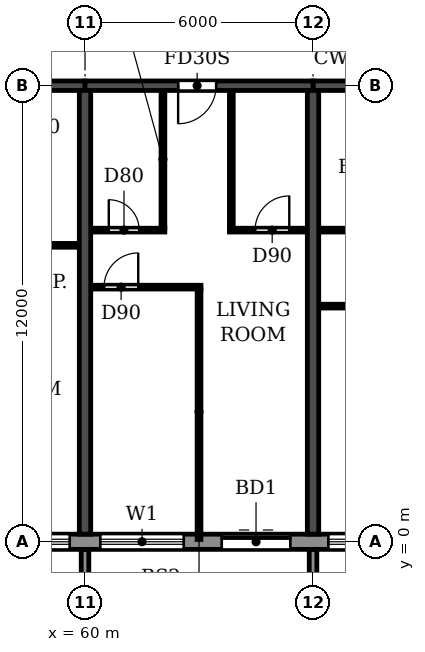
"""IFC4 building model, lengths in metres.
Left out: names, types, materials, properties, quantities, classifications, styles, units other than length and angle.
Written with IfcOpenShell. Run it as: python <this file> out.ifc"""

import sys

from ifc_helpers import new_model, si_unit, direction, frame, frame_2d, origin, place, context, subcontext, project, spatial, polyline, rectangle, outline, extrude, source, transform, mapped, element, fill, save


model = new_model("IFC4")
c1 = context("Model", 3, precision=1e-05, world=origin(), true_north=direction((0.0, 1.0)))
c2 = subcontext(c1, "Body", "Model", "MODEL_VIEW")
j1 = project(units=[si_unit("LENGTHUNIT", "METRE"), si_unit("PLANEANGLEUNIT", "RADIAN")], contexts=[c1])
p1 = place(None, origin())
s1 = spatial("IfcSite", under=j1, at=p1, CompositionType="ELEMENT")
p2 = place(p1, origin())
s2 = spatial("IfcBuilding", under=s1, at=p2, CompositionType="ELEMENT")
p3 = place(p2, frame((0.0, 0.0, 122.4)))
s3 = spatial("IfcBuildingStorey", under=s2, at=p3, CompositionType="ELEMENT", Elevation=122.4)
for number, where, z_axis, x_axis in (
    (1, (60.0, 0.2, 0.0), (0.0, 0.0, 1.0), (0.0, 1.0, 0.0)),
    (2, (66.0, 0.2, 0.0), (0.0, 0.0, 1.0), (0.0, 1.0, 0.0)),
):
    element("IfcWall", number, at=place(p3, frame(where, z_axis=z_axis, x_axis=x_axis)), inside=s3, PredefinedType="SHEAR", context=c2, shape_type="SweptSolid", body=[
        extrude(rectangle(XDim=11.675, YDim=0.3, at=frame_2d((5.837, 0.0))), origin(), (0.0, 0.0, 1.0), 3.07),
    ])
p4 = place(p3, frame((54.0, 12.0, 0.0), z_axis=(0.0, 0.0, 1.0), x_axis=(1.0, 0.0, 0.0)))
e3 = element("IfcWall", 3, at=p4, inside=s3, PredefinedType="SHEAR", context=c2, shape_type="SweptSolid", body=[
    extrude(rectangle(XDim=6.0, YDim=0.25, at=frame_2d((3.0, 0.0))), origin(), (0.0, 0.0, 1.0), 2.47),
])
p5 = place(p4, frame((2.45, 0.0, 0.0)))
e4 = element("IfcOpeningElement", 4, at=p5, cuts=e3, PredefinedType="OPENING", context=c2, shape_type="SweptSolid", body=[
    extrude(rectangle(XDim=1.0, YDim=2.1, at=frame_2d((0.5, 1.05))), frame((0.0, 0.135, 0.0), z_axis=(0.0, -1.0, 0.0), x_axis=(1.0, 0.0, 0.0)), (0.0, 0.0, 1.0), 0.27),
])
p6 = place(p3, frame((60.0, 12.0, 0.0), z_axis=(0.0, 0.0, 1.0), x_axis=(1.0, 0.0, 0.0)))
e5 = element("IfcWall", 5, at=p6, inside=s3, PredefinedType="SHEAR", context=c2, shape_type="SweptSolid", body=[
    extrude(rectangle(XDim=6.0, YDim=0.25, at=frame_2d((3.0, 0.0))), origin(), (0.0, 0.0, 1.0), 2.47),
])
p7 = place(p6, frame((2.45, 0.0, 0.0)))
e6 = element("IfcOpeningElement", 6, at=p7, cuts=e5, PredefinedType="OPENING", context=c2, shape_type="SweptSolid", body=[
    extrude(rectangle(XDim=1.0, YDim=2.1, at=frame_2d((0.5, 1.05))), frame((0.0, 0.135, 0.0), z_axis=(0.0, -1.0, 0.0), x_axis=(1.0, 0.0, 0.0)), (0.0, 0.0, 1.0), 0.27),
])
p8 = place(p3, frame((66.0, 12.0, 0.0), z_axis=(0.0, 0.0, 1.0), x_axis=(1.0, 0.0, 0.0)))
e7 = element("IfcWall", 7, at=p8, inside=s3, PredefinedType="SHEAR", context=c2, shape_type="SweptSolid", body=[
    extrude(rectangle(XDim=6.0, YDim=0.25, at=frame_2d((3.0, 0.0))), origin(), (0.0, 0.0, 1.0), 2.47),
])
p9 = place(p3, frame((16.683, 0.0, 0.0), z_axis=(0.0, 0.0, 1.0), x_axis=(1.0, 0.0, 0.0)))
e8 = element("IfcWall", 8, at=p9, inside=s3, PredefinedType="STANDARD", context=c2, shape_type="SweptSolid", body=[
    extrude(rectangle(XDim=68.634, YDim=0.4, at=frame_2d((34.317, 0.0))), origin(), (0.0, 0.0, 1.0), 3.07),
])
p10 = place(p9, frame((1.717, 0.0, 0.9)))
e9 = element("IfcOpeningElement", 9, at=p10, cuts=e8, PredefinedType="OPENING", context=c2, shape_type="SweptSolid", body=[
    extrude(rectangle(XDim=2.2, YDim=1.5, at=frame_2d((1.1, 0.75))), frame((0.0, 0.21, 0.0), z_axis=(0.0, -1.0, 0.0), x_axis=(1.0, 0.0, 0.0)), (0.0, 0.0, 1.0), 0.42),
])
p11 = place(p9, frame((4.717, 0.0, 0.9)))
e10 = element("IfcOpeningElement", 10, at=p11, cuts=e8, PredefinedType="OPENING", context=c2, shape_type="SweptSolid", body=[
    extrude(rectangle(XDim=2.2, YDim=1.5, at=frame_2d((1.1, 0.75))), frame((0.0, 0.21, 0.0), z_axis=(0.0, -1.0, 0.0), x_axis=(1.0, 0.0, 0.0)), (0.0, 0.0, 1.0), 0.42),
])
p12 = place(p9, frame((7.717, 0.0, 0.9)))
e11 = element("IfcOpeningElement", 11, at=p12, cuts=e8, PredefinedType="OPENING", context=c2, shape_type="SweptSolid", body=[
    extrude(rectangle(XDim=2.2, YDim=1.5, at=frame_2d((1.1, 0.75))), frame((0.0, 0.21, 0.0), z_axis=(0.0, -1.0, 0.0), x_axis=(1.0, 0.0, 0.0)), (0.0, 0.0, 1.0), 0.42),
])
p13 = place(p9, frame((10.717, 0.0, 0.9)))
e12 = element("IfcOpeningElement", 12, at=p13, cuts=e8, PredefinedType="OPENING", context=c2, shape_type="SweptSolid", body=[
    extrude(rectangle(XDim=2.2, YDim=1.5, at=frame_2d((1.1, 0.75))), frame((0.0, 0.21, 0.0), z_axis=(0.0, -1.0, 0.0), x_axis=(1.0, 0.0, 0.0)), (0.0, 0.0, 1.0), 0.42),
])
p14 = place(p9, frame((13.717, 0.0, 0.9)))
e13 = element("IfcOpeningElement", 13, at=p14, cuts=e8, PredefinedType="OPENING", context=c2, shape_type="SweptSolid", body=[
    extrude(rectangle(XDim=2.2, YDim=1.5, at=frame_2d((1.1, 0.75))), frame((0.0, 0.21, 0.0), z_axis=(0.0, -1.0, 0.0), x_axis=(1.0, 0.0, 0.0)), (0.0, 0.0, 1.0), 0.42),
])
p15 = place(p9, frame((16.717, 0.0, 0.9)))
e14 = element("IfcOpeningElement", 14, at=p15, cuts=e8, PredefinedType="OPENING", context=c2, shape_type="SweptSolid", body=[
    extrude(rectangle(XDim=2.2, YDim=1.5, at=frame_2d((1.1, 0.75))), frame((0.0, 0.21, 0.0), z_axis=(0.0, -1.0, 0.0), x_axis=(1.0, 0.0, 0.0)), (0.0, 0.0, 1.0), 0.42),
])
p16 = place(p9, frame((19.717, 0.0, 0.9)))
e15 = element("IfcOpeningElement", 15, at=p16, cuts=e8, PredefinedType="OPENING", context=c2, shape_type="SweptSolid", body=[
    extrude(rectangle(XDim=2.2, YDim=1.5, at=frame_2d((1.1, 0.75))), frame((0.0, 0.21, 0.0), z_axis=(0.0, -1.0, 0.0), x_axis=(1.0, 0.0, 0.0)), (0.0, 0.0, 1.0), 0.42),
])
p17 = place(p9, frame((22.917, 0.0, 0.0)))
e16 = element("IfcOpeningElement", 16, at=p17, cuts=e8, PredefinedType="OPENING", context=c2, shape_type="SweptSolid", body=[
    extrude(rectangle(XDim=1.8, YDim=2.4, at=frame_2d((0.9, 1.2))), frame((0.0, 0.21, 0.0), z_axis=(0.0, -1.0, 0.0), x_axis=(1.0, 0.0, 0.0)), (0.0, 0.0, 1.0), 0.42),
])
p18 = place(p9, frame((25.717, 0.0, 0.9)))
e17 = element("IfcOpeningElement", 17, at=p18, cuts=e8, PredefinedType="OPENING", context=c2, shape_type="SweptSolid", body=[
    extrude(rectangle(XDim=2.2, YDim=1.5, at=frame_2d((1.1, 0.75))), frame((0.0, 0.21, 0.0), z_axis=(0.0, -1.0, 0.0), x_axis=(1.0, 0.0, 0.0)), (0.0, 0.0, 1.0), 0.42),
])
p19 = place(p9, frame((28.717, 0.0, 0.9)))
e18 = element("IfcOpeningElement", 18, at=p19, cuts=e8, PredefinedType="OPENING", context=c2, shape_type="SweptSolid", body=[
    extrude(rectangle(XDim=2.2, YDim=1.5, at=frame_2d((1.1, 0.75))), frame((0.0, 0.21, 0.0), z_axis=(0.0, -1.0, 0.0), x_axis=(1.0, 0.0, 0.0)), (0.0, 0.0, 1.0), 0.42),
])
p20 = place(p9, frame((31.717, 0.0, 0.9)))
e19 = element("IfcOpeningElement", 19, at=p20, cuts=e8, PredefinedType="OPENING", context=c2, shape_type="SweptSolid", body=[
    extrude(rectangle(XDim=2.2, YDim=1.5, at=frame_2d((1.1, 0.75))), frame((0.0, 0.21, 0.0), z_axis=(0.0, -1.0, 0.0), x_axis=(1.0, 0.0, 0.0)), (0.0, 0.0, 1.0), 0.42),
])
p21 = place(p9, frame((34.917, 0.0, 0.0)))
e20 = element("IfcOpeningElement", 20, at=p21, cuts=e8, PredefinedType="OPENING", context=c2, shape_type="SweptSolid", body=[
    extrude(rectangle(XDim=1.8, YDim=2.4, at=frame_2d((0.9, 1.2))), frame((0.0, 0.21, 0.0), z_axis=(0.0, -1.0, 0.0), x_axis=(1.0, 0.0, 0.0)), (0.0, 0.0, 1.0), 0.42),
])
p22 = place(p9, frame((37.717, 0.0, 0.9)))
e21 = element("IfcOpeningElement", 21, at=p22, cuts=e8, PredefinedType="OPENING", context=c2, shape_type="SweptSolid", body=[
    extrude(rectangle(XDim=2.2, YDim=1.5, at=frame_2d((1.1, 0.75))), frame((0.0, 0.21, 0.0), z_axis=(0.0, -1.0, 0.0), x_axis=(1.0, 0.0, 0.0)), (0.0, 0.0, 1.0), 0.42),
])
p23 = place(p9, frame((40.717, 0.0, 0.9)))
e22 = element("IfcOpeningElement", 22, at=p23, cuts=e8, PredefinedType="OPENING", context=c2, shape_type="SweptSolid", body=[
    extrude(rectangle(XDim=2.2, YDim=1.5, at=frame_2d((1.1, 0.75))), frame((0.0, 0.21, 0.0), z_axis=(0.0, -1.0, 0.0), x_axis=(1.0, 0.0, 0.0)), (0.0, 0.0, 1.0), 0.42),
])
p24 = place(p9, frame((43.717, 0.0, 0.9)))
e23 = element("IfcOpeningElement", 23, at=p24, cuts=e8, PredefinedType="OPENING", context=c2, shape_type="SweptSolid", body=[
    extrude(rectangle(XDim=2.2, YDim=1.5, at=frame_2d((1.1, 0.75))), frame((0.0, 0.21, 0.0), z_axis=(0.0, -1.0, 0.0), x_axis=(1.0, 0.0, 0.0)), (0.0, 0.0, 1.0), 0.42),
])
p25 = place(p9, frame((46.917, 0.0, 0.0)))
e24 = element("IfcOpeningElement", 24, at=p25, cuts=e8, PredefinedType="OPENING", context=c2, shape_type="SweptSolid", body=[
    extrude(rectangle(XDim=1.8, YDim=2.4, at=frame_2d((0.9, 1.2))), frame((0.0, 0.21, 0.0), z_axis=(0.0, -1.0, 0.0), x_axis=(1.0, 0.0, 0.0)), (0.0, 0.0, 1.0), 0.42),
])
p26 = place(p9, frame((49.717, 0.0, 0.9)))
e25 = element("IfcOpeningElement", 25, at=p26, cuts=e8, PredefinedType="OPENING", context=c2, shape_type="SweptSolid", body=[
    extrude(rectangle(XDim=2.2, YDim=1.5, at=frame_2d((1.1, 0.75))), frame((0.0, 0.21, 0.0), z_axis=(0.0, -1.0, 0.0), x_axis=(1.0, 0.0, 0.0)), (0.0, 0.0, 1.0), 0.42),
])
p27 = place(p9, frame((52.717, 0.0, 0.9)))
e26 = element("IfcOpeningElement", 26, at=p27, cuts=e8, PredefinedType="OPENING", context=c2, shape_type="SweptSolid", body=[
    extrude(rectangle(XDim=2.2, YDim=1.5, at=frame_2d((1.1, 0.75))), frame((0.0, 0.21, 0.0), z_axis=(0.0, -1.0, 0.0), x_axis=(1.0, 0.0, 0.0)), (0.0, 0.0, 1.0), 0.42),
])
p28 = place(p9, frame((55.717, 0.0, 0.9)))
e27 = element("IfcOpeningElement", 27, at=p28, cuts=e8, PredefinedType="OPENING", context=c2, shape_type="SweptSolid", body=[
    extrude(rectangle(XDim=2.2, YDim=1.5, at=frame_2d((1.1, 0.75))), frame((0.0, 0.21, 0.0), z_axis=(0.0, -1.0, 0.0), x_axis=(1.0, 0.0, 0.0)), (0.0, 0.0, 1.0), 0.42),
])
p29 = place(p9, frame((58.917, 0.0, 0.0)))
e28 = element("IfcOpeningElement", 28, at=p29, cuts=e8, PredefinedType="OPENING", context=c2, shape_type="SweptSolid", body=[
    extrude(rectangle(XDim=1.8, YDim=2.4, at=frame_2d((0.9, 1.2))), frame((0.0, 0.21, 0.0), z_axis=(0.0, -1.0, 0.0), x_axis=(1.0, 0.0, 0.0)), (0.0, 0.0, 1.0), 0.42),
])
p30 = place(p9, frame((61.717, 0.0, 0.9)))
e29 = element("IfcOpeningElement", 29, at=p30, cuts=e8, PredefinedType="OPENING", context=c2, shape_type="SweptSolid", body=[
    extrude(rectangle(XDim=2.2, YDim=1.5, at=frame_2d((1.1, 0.75))), frame((0.0, 0.21, 0.0), z_axis=(0.0, -1.0, 0.0), x_axis=(1.0, 0.0, 0.0)), (0.0, 0.0, 1.0), 0.42),
])
p31 = place(p9, frame((64.717, 0.0, 0.9)))
e30 = element("IfcOpeningElement", 30, at=p31, cuts=e8, PredefinedType="OPENING", context=c2, shape_type="SweptSolid", body=[
    extrude(rectangle(XDim=2.2, YDim=1.5, at=frame_2d((1.1, 0.75))), frame((0.0, 0.21, 0.0), z_axis=(0.0, -1.0, 0.0), x_axis=(1.0, 0.0, 0.0)), (0.0, 0.0, 1.0), 0.42),
])
m1 = source(origin(), c2, "Body", "SweptSolid", [
    extrude(outline(polyline([(0.0, 0.0), (0.2, 0.0), (0.2, 1.65), (0.0, 1.65), (0.0, 0.0)])), origin(), (0.0, 0.0, 1.0), 3.1),
])
for number, where in (
    (31, (59.9, -1.85, 0.0)),
    (32, (65.9, -1.85, 0.0)),
):
    element("IfcWall", number, at=place(p3, frame(where)), inside=s3, PredefinedType="STANDARD", context=c2, shape_type="MappedRepresentation", body=[
        mapped(m1, transform((0.0, 0.0, 0.0))),
    ])
p32 = place(p3, frame((66.16, 6.2, 0.0), z_axis=(0.0, 0.0, 1.0), x_axis=(1.0, 0.0, 0.0)))
e33 = element("IfcWall", 33, at=p32, inside=s3, PredefinedType="PARTITIONING", context=c2, shape_type="SweptSolid", body=[
    extrude(rectangle(XDim=5.68, YDim=0.1, at=frame_2d((2.84, 0.0))), origin(), (0.0, 0.0, 1.0), 3.07),
])
p33 = place(p32, frame((1.44, 0.0, 0.0)))
e34 = element("IfcOpeningElement", 34, at=p33, cuts=e33, PredefinedType="OPENING", context=c2, shape_type="SweptSolid", body=[
    extrude(rectangle(XDim=0.9, YDim=2.1, at=frame_2d((0.45, 1.05))), frame((0.0, 0.06, 0.0), z_axis=(0.0, -1.0, 0.0), x_axis=(1.0, 0.0, 0.0)), (0.0, 0.0, 1.0), 0.12),
])
p34 = place(p32, frame((3.34, 0.0, 0.0)))
e35 = element("IfcOpeningElement", 35, at=p34, cuts=e33, PredefinedType="OPENING", context=c2, shape_type="SweptSolid", body=[
    extrude(rectangle(XDim=0.9, YDim=2.1, at=frame_2d((0.45, 1.05))), frame((0.0, 0.06, 0.0), z_axis=(0.0, -1.0, 0.0), x_axis=(1.0, 0.0, 0.0)), (0.0, 0.0, 1.0), 0.12),
])
p35 = place(p3, frame((60.16, 6.7, 0.0), z_axis=(0.0, 0.0, 1.0), x_axis=(1.0, 0.0, 0.0)))
e36 = element("IfcWall", 36, at=p35, inside=s3, PredefinedType="PARTITIONING", context=c2, shape_type="SweptSolid", body=[
    extrude(rectangle(XDim=2.89, YDim=0.1, at=frame_2d((1.445, 0.0))), origin(), (0.0, 0.0, 1.0), 3.07),
])
p36 = place(p35, frame((0.34, 0.0, 0.0)))
e37 = element("IfcOpeningElement", 37, at=p36, cuts=e36, PredefinedType="OPENING", context=c2, shape_type="SweptSolid", body=[
    extrude(rectangle(XDim=0.9, YDim=2.1, at=frame_2d((0.45, 1.05))), frame((0.0, 0.06, 0.0), z_axis=(0.0, -1.0, 0.0), x_axis=(1.0, 0.0, 0.0)), (0.0, 0.0, 1.0), 0.12),
])
p37 = place(p3, frame((57.8, 7.8, 0.0), z_axis=(0.0, 0.0, 1.0), x_axis=(1.0, 0.0, 0.0)))
e38 = element("IfcWall", 38, at=p37, inside=s3, PredefinedType="PARTITIONING", context=c2, shape_type="SweptSolid", body=[
    extrude(rectangle(XDim=2.04, YDim=0.1, at=frame_2d((1.02, 0.0))), origin(), (0.0, 0.0, 1.0), 3.07),
])
p38 = place(p3, frame((60.16, 8.2, 0.0), z_axis=(0.0, 0.0, 1.0), x_axis=(1.0, 0.0, 0.0)))
e39 = element("IfcWall", 39, at=p38, inside=s3, PredefinedType="PARTITIONING", context=c2, shape_type="SweptSolid", body=[
    extrude(rectangle(XDim=1.94, YDim=0.1, at=frame_2d((0.97, 0.0))), origin(), (0.0, 0.0, 1.0), 3.07),
])
p39 = place(p38, frame((0.465, 0.0, 0.0)))
e40 = element("IfcOpeningElement", 40, at=p39, cuts=e39, PredefinedType="OPENING", context=c2, shape_type="SweptSolid", body=[
    extrude(rectangle(XDim=0.8, YDim=2.1, at=frame_2d((0.4, 1.05))), frame((0.0, 0.06, 0.0), z_axis=(0.0, -1.0, 0.0), x_axis=(1.0, 0.0, 0.0)), (0.0, 0.0, 1.0), 0.12),
])
p40 = place(p3, frame((63.8, 8.2, 0.0), z_axis=(0.0, 0.0, 1.0), x_axis=(1.0, 0.0, 0.0)))
e41 = element("IfcWall", 41, at=p40, inside=s3, PredefinedType="PARTITIONING", context=c2, shape_type="SweptSolid", body=[
    extrude(rectangle(XDim=2.04, YDim=0.1, at=frame_2d((1.02, 0.0))), origin(), (0.0, 0.0, 1.0), 3.07),
])
p41 = place(p40, frame((0.675, 0.0, 0.0)))
e42 = element("IfcOpeningElement", 42, at=p41, cuts=e41, PredefinedType="OPENING", context=c2, shape_type="SweptSolid", body=[
    extrude(rectangle(XDim=0.9, YDim=2.1, at=frame_2d((0.45, 1.05))), frame((0.0, 0.06, 0.0), z_axis=(0.0, -1.0, 0.0), x_axis=(1.0, 0.0, 0.0)), (0.0, 0.0, 1.0), 0.12),
])
p42 = place(p3, frame((66.16, 8.2, 0.0), z_axis=(0.0, 0.0, 1.0), x_axis=(1.0, 0.0, 0.0)))
e43 = element("IfcWall", 43, at=p42, inside=s3, PredefinedType="PARTITIONING", context=c2, shape_type="SweptSolid", body=[
    extrude(rectangle(XDim=3.19, YDim=0.1, at=frame_2d((1.595, 0.0))), origin(), (0.0, 0.0, 1.0), 3.07),
])
p43 = place(p42, frame((1.09, 0.0, 0.0)))
e44 = element("IfcOpeningElement", 44, at=p43, cuts=e43, PredefinedType="OPENING", context=c2, shape_type="SweptSolid", body=[
    extrude(rectangle(XDim=0.8, YDim=2.1, at=frame_2d((0.4, 1.05))), frame((0.0, 0.06, 0.0), z_axis=(0.0, -1.0, 0.0), x_axis=(1.0, 0.0, 0.0)), (0.0, 0.0, 1.0), 0.12),
])
p44 = place(p3, frame((62.05, 8.25, 0.0), z_axis=(0.0, 0.0, 1.0), x_axis=(0.0, 1.0, 0.0)))
e45 = element("IfcWall", 45, at=p44, inside=s3, PredefinedType="PARTITIONING", context=c2, shape_type="SweptSolid", body=[
    extrude(rectangle(XDim=3.615, YDim=0.1, at=frame_2d((1.808, 0.0))), origin(), (0.0, 0.0, 1.0), 3.07),
])
p45 = place(p3, frame((63.0, 0.06, 0.0), z_axis=(0.0, 0.0, 1.0), x_axis=(0.0, 1.0, 0.0)))
e46 = element("IfcWall", 46, at=p45, inside=s3, PredefinedType="PARTITIONING", context=c2, shape_type="SweptSolid", body=[
    extrude(rectangle(XDim=6.59, YDim=0.1, at=frame_2d((3.295, 0.0))), origin(), (0.0, 0.0, 1.0), 3.07),
])
p46 = place(p3, frame((63.85, 8.25, 0.0), z_axis=(0.0, 0.0, 1.0), x_axis=(0.0, 1.0, 0.0)))
e47 = element("IfcWall", 47, at=p46, inside=s3, PredefinedType="PARTITIONING", context=c2, shape_type="SweptSolid", body=[
    extrude(rectangle(XDim=3.615, YDim=0.1, at=frame_2d((1.808, 0.0))), origin(), (0.0, 0.0, 1.0), 3.07),
])
p47 = place(p23, origin())
e48 = element("IfcWindow", 48, at=p47, inside=s3, PartitioningType="DOUBLE_PANEL_HORIZONTAL", PredefinedType="WINDOW", context=c2, shape_type="SweptSolid", body=[
    extrude(rectangle(XDim=2.2, YDim=1.5, at=frame_2d((1.1, 0.75))), frame((0.0, 0.03, 0.0), z_axis=(0.0, -1.0, 0.0), x_axis=(1.0, 0.0, 0.0)), (0.0, 0.0, 1.0), 0.06),
])
fill(e22, e48)
p48 = place(p24, origin())
e49 = element("IfcWindow", 49, at=p48, inside=s3, PartitioningType="DOUBLE_PANEL_HORIZONTAL", PredefinedType="WINDOW", context=c2, shape_type="SweptSolid", body=[
    extrude(rectangle(XDim=2.2, YDim=1.5, at=frame_2d((1.1, 0.75))), frame((0.0, 0.03, 0.0), z_axis=(0.0, -1.0, 0.0), x_axis=(1.0, 0.0, 0.0)), (0.0, 0.0, 1.0), 0.06),
])
fill(e23, e49)
p49 = place(p25, origin())
e50 = element("IfcDoor", 50, at=p49, inside=s3, OperationType="DOUBLE_DOOR_SLIDING", PredefinedType="DOOR", context=c2, shape_type="SweptSolid", body=[
    extrude(rectangle(XDim=1.8, YDim=2.4, at=frame_2d((0.9, 1.2))), frame((0.0, 0.025, 0.0), z_axis=(0.0, -1.0, 0.0), x_axis=(1.0, 0.0, 0.0)), (0.0, 0.0, 1.0), 0.05),
])
fill(e24, e50)
p50 = place(p26, origin())
e51 = element("IfcWindow", 51, at=p50, inside=s3, PartitioningType="DOUBLE_PANEL_HORIZONTAL", PredefinedType="WINDOW", context=c2, shape_type="SweptSolid", body=[
    extrude(rectangle(XDim=2.2, YDim=1.5, at=frame_2d((1.1, 0.75))), frame((0.0, 0.03, 0.0), z_axis=(0.0, -1.0, 0.0), x_axis=(1.0, 0.0, 0.0)), (0.0, 0.0, 1.0), 0.06),
])
fill(e25, e51)
p51 = place(p36, origin())
e52 = element("IfcDoor", 52, at=p51, inside=s3, OperationType="SINGLE_SWING_RIGHT", PredefinedType="DOOR", context=c2, shape_type="SweptSolid", body=[
    extrude(rectangle(XDim=0.9, YDim=2.1, at=frame_2d((0.45, 1.05))), frame((0.0, 0.025, 0.0), z_axis=(0.0, -1.0, 0.0), x_axis=(1.0, 0.0, 0.0)), (0.0, 0.0, 1.0), 0.05),
])
fill(e37, e52)
p52 = place(p39, origin())
e53 = element("IfcDoor", 53, at=p52, inside=s3, OperationType="SINGLE_SWING_LEFT", PredefinedType="DOOR", context=c2, shape_type="SweptSolid", body=[
    extrude(rectangle(XDim=0.8, YDim=2.1, at=frame_2d((0.4, 1.05))), frame((0.0, 0.025, 0.0), z_axis=(0.0, -1.0, 0.0), x_axis=(1.0, 0.0, 0.0)), (0.0, 0.0, 1.0), 0.05),
])
fill(e40, e53)
p53 = place(p7, frame((1.0, 0.0, 0.0), z_axis=(0.0, 0.0, 1.0), x_axis=(-1.0, 0.0, 0.0)))
e54 = element("IfcDoor", 54, at=p53, inside=s3, OperationType="SINGLE_SWING_RIGHT", PredefinedType="DOOR", context=c2, shape_type="SweptSolid", body=[
    extrude(rectangle(XDim=1.0, YDim=2.1, at=frame_2d((0.5, 1.05))), frame((0.0, 0.025, 0.0), z_axis=(0.0, -1.0, 0.0), x_axis=(1.0, 0.0, 0.0)), (0.0, 0.0, 1.0), 0.05),
])
fill(e6, e54)
p54 = place(p41, origin())
e55 = element("IfcDoor", 55, at=p54, inside=s3, OperationType="SINGLE_SWING_RIGHT", PredefinedType="DOOR", context=c2, shape_type="SweptSolid", body=[
    extrude(rectangle(XDim=0.9, YDim=2.1, at=frame_2d((0.45, 1.05))), frame((0.0, 0.025, 0.0), z_axis=(0.0, -1.0, 0.0), x_axis=(1.0, 0.0, 0.0)), (0.0, 0.0, 1.0), 0.05),
])
fill(e42, e55)
save(model, sys.argv[1])
